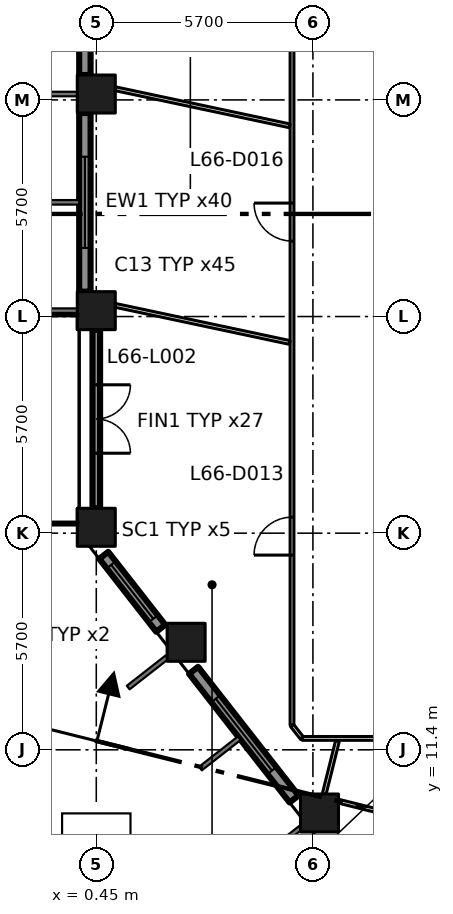
"""IFC4 building model, lengths in metres.
Left out: names, types, materials, properties, quantities, classifications, styles, units other than length and angle.
Written with IfcOpenShell. Run it as: python <this file> out.ifc"""

import sys

from ifc_helpers import new_model, si_unit, direction, frame, frame_2d, origin, origin_2d, place, context, subcontext, project, spatial, rectangle, extrude, element, fill, save


model = new_model("IFC4")
c1 = context("Model", 3, precision=1e-05, world=origin(), true_north=direction((0.0, 1.0)))
c2 = subcontext(c1, "Body", "Model", "MODEL_VIEW")
j1 = project(units=[si_unit("LENGTHUNIT", "METRE"), si_unit("PLANEANGLEUNIT", "RADIAN")], contexts=[c1])
p1 = place(None, origin())
s1 = spatial("IfcSite", under=j1, at=p1, CompositionType="ELEMENT")
p2 = place(p1, origin())
s2 = spatial("IfcBuilding", under=s1, at=p2, CompositionType="ELEMENT")
p3 = place(p2, frame((0.0, 0.0, 289.8)))
s3 = spatial("IfcBuildingStorey", under=s2, at=p3, CompositionType="ELEMENT", Elevation=289.8)
for number, where, z_axis, x_axis in (
    (1, (0.45, 17.255, 0.0), (0.0, 0.0, 1.0), (1.0, 0.0, 0.0)),
    (2, (0.45, 22.955, 0.0), (0.0, 0.0, 1.0), (1.0, 0.0, 0.0)),
    (3, (0.45, 28.655, 0.0), (0.0, 0.0, 1.0), (1.0, 0.0, 0.0)),
    (4, (6.323, 9.737, 0.0), (0.0, 0.0, 1.0), (1.0, 0.0, 0.0)),
    (5, (2.814, 14.229, 0.0), (0.0, 0.0, 1.0), (1.0, 0.0, 0.0)),
):
    element("IfcColumn", number, at=place(p3, frame(where, z_axis=z_axis, x_axis=x_axis)), inside=s3, PredefinedType="COLUMN", context=c2, shape_type="SweptSolid", body=[
        extrude(rectangle(XDim=1.0, YDim=1.0, at=origin_2d()), origin(), (0.0, 0.0, 1.0), 4.2),
    ])
p4 = place(p3, frame((0.15, 33.855, 0.0), z_axis=(0.0, 0.0, 1.0), x_axis=(0.0, -1.0, 0.0)))
e6 = element("IfcWall", 6, at=p4, inside=s3, PredefinedType="SOLIDWALL", context=c2, shape_type="SweptSolid", body=[
    extrude(rectangle(XDim=4.7, YDim=0.3, at=frame_2d((2.35, 0.0))), origin(), (0.0, 0.0, 1.0), 3.2),
])
p5 = place(p4, frame((1.15, 0.0, 0.8)))
e7 = element("IfcOpeningElement", 7, at=p5, cuts=e6, PredefinedType="OPENING", context=c2, shape_type="SweptSolid", body=[
    extrude(rectangle(XDim=2.4, YDim=2.1, at=frame_2d((1.2, 1.05))), frame((0.0, 0.16, 0.0), z_axis=(0.0, -1.0, 0.0), x_axis=(1.0, 0.0, 0.0)), (0.0, 0.0, 1.0), 0.32),
])
p6 = place(p3, frame((0.15, 28.155, 0.0), z_axis=(0.0, 0.0, 1.0), x_axis=(0.0, -1.0, 0.0)))
e8 = element("IfcWall", 8, at=p6, inside=s3, PredefinedType="SOLIDWALL", context=c2, shape_type="SweptSolid", body=[
    extrude(rectangle(XDim=4.7, YDim=0.3, at=frame_2d((2.35, 0.0))), origin(), (0.0, 0.0, 1.0), 3.2),
])
p7 = place(p6, frame((1.15, 0.0, 0.8)))
e9 = element("IfcOpeningElement", 9, at=p7, cuts=e8, PredefinedType="OPENING", context=c2, shape_type="SweptSolid", body=[
    extrude(rectangle(XDim=2.4, YDim=2.1, at=frame_2d((1.2, 1.05))), frame((0.0, 0.16, 0.0), z_axis=(0.0, -1.0, 0.0), x_axis=(1.0, 0.0, 0.0)), (0.0, 0.0, 1.0), 0.32),
])
p8 = place(p3, frame((0.45, 22.454, 0.0), z_axis=(0.0, 0.0, 1.0), x_axis=(0.0, -1.0, 0.0)))
e10 = element("IfcWall", 10, at=p8, inside=s3, PredefinedType="SOLIDWALL", context=c2, shape_type="SweptSolid", body=[
    extrude(rectangle(XDim=4.699, YDim=0.2, at=frame_2d((2.35, 0.0))), origin(), (0.0, 0.0, 1.0), 3.2),
])
p9 = place(p8, frame((1.45, 0.0, 0.0)))
e11 = element("IfcOpeningElement", 11, at=p9, cuts=e10, PredefinedType="OPENING", context=c2, shape_type="SweptSolid", body=[
    extrude(rectangle(XDim=1.8, YDim=2.9, at=frame_2d((0.9, 1.45))), frame((0.0, 0.11, 0.0), z_axis=(0.0, -1.0, 0.0), x_axis=(1.0, 0.0, 0.0)), (0.0, 0.0, 1.0), 0.22),
])
p10 = place(p3, frame((-0.88, 22.785, 0.0), z_axis=(0.0, 0.0, 1.0), x_axis=(0.0, -1.0, 0.0)))
e12 = element("IfcWall", 12, at=p10, inside=s3, PredefinedType="SOLIDWALL", context=c2, shape_type="SweptSolid", body=[
    extrude(rectangle(XDim=5.36, YDim=0.4, at=frame_2d((2.68, 0.0))), origin(), (0.0, 0.0, 1.0), 0.3),
])
p11 = place(p3, frame((0.646, 16.517, 0.0), z_axis=(0.0, 0.0, 1.0), x_axis=(0.615610986717, -0.788050197026, 0.0)))
e13 = element("IfcWall", 13, at=p11, inside=s3, PredefinedType="SOLIDWALL", context=c2, shape_type="SweptSolid", body=[
    extrude(rectangle(XDim=2.437, YDim=0.3, at=frame_2d((1.218, 0.0))), origin(), (0.0, 0.0, 1.0), 3.2),
])
p12 = place(p11, frame((0.318, 0.0, 0.8)))
e14 = element("IfcOpeningElement", 14, at=p12, cuts=e13, PredefinedType="OPENING", context=c2, shape_type="SweptSolid", body=[
    extrude(rectangle(XDim=1.8, YDim=2.1, at=frame_2d((0.9, 1.05))), frame((0.0, 0.16, 0.0), z_axis=(0.0, -1.0, 0.0), x_axis=(1.0, 0.0, 0.0)), (0.0, 0.0, 1.0), 0.32),
])
p13 = place(p3, frame((3.01, 13.491, 0.0), z_axis=(0.0, 0.0, 1.0), x_axis=(0.615713519567, -0.787970089421, 0.0)))
e15 = element("IfcWall", 15, at=p13, inside=s3, PredefinedType="SOLIDWALL", context=c2, shape_type="SweptSolid", body=[
    extrude(rectangle(XDim=4.296, YDim=0.3, at=frame_2d((2.148, 0.0))), origin(), (0.0, 0.0, 1.0), 3.2),
])
p14 = place(p13, frame((0.948, 0.0, 0.8)))
e16 = element("IfcOpeningElement", 16, at=p14, cuts=e15, PredefinedType="OPENING", context=c2, shape_type="SweptSolid", body=[
    extrude(rectangle(XDim=2.4, YDim=2.1, at=frame_2d((1.2, 1.05))), frame((0.0, 0.16, 0.0), z_axis=(0.0, -1.0, 0.0), x_axis=(1.0, 0.0, 0.0)), (0.0, 0.0, 1.0), 0.32),
])
p15 = place(p3, frame((5.6, 12.043, 0.0), z_axis=(0.0, 0.0, 1.0), x_axis=(0.0, 1.0, 0.0)))
e17 = element("IfcWall", 17, at=p15, inside=s3, PredefinedType="PARTITIONING", context=c2, shape_type="SweptSolid", body=[
    extrude(rectangle(XDim=27.162, YDim=0.1, at=frame_2d((13.581, 0.0))), origin(), (0.0, 0.0, 1.0), 3.9),
])
p16 = place(p15, frame((4.48, 0.0, 0.0)))
e18 = element("IfcOpeningElement", 18, at=p16, cuts=e17, PredefinedType="OPENING", context=c2, shape_type="SweptSolid", body=[
    extrude(rectangle(XDim=1.0, YDim=2.1, at=frame_2d((0.5, 1.05))), frame((0.0, 0.06, 0.0), z_axis=(0.0, -1.0, 0.0), x_axis=(1.0, 0.0, 0.0)), (0.0, 0.0, 1.0), 0.12),
])
p17 = place(p15, frame((12.742, 0.0, 0.0)))
e19 = element("IfcOpeningElement", 19, at=p17, cuts=e17, PredefinedType="OPENING", context=c2, shape_type="SweptSolid", body=[
    extrude(rectangle(XDim=1.0, YDim=2.1, at=frame_2d((0.5, 1.05))), frame((0.0, 0.06, 0.0), z_axis=(0.0, -1.0, 0.0), x_axis=(1.0, 0.0, 0.0)), (0.0, 0.0, 1.0), 0.12),
])
p18 = place(p15, frame((21.142, 0.0, 0.0)))
e20 = element("IfcOpeningElement", 20, at=p18, cuts=e17, PredefinedType="OPENING", context=c2, shape_type="SweptSolid", body=[
    extrude(rectangle(XDim=1.0, YDim=2.1, at=frame_2d((0.5, 1.05))), frame((0.0, 0.06, 0.0), z_axis=(0.0, -1.0, 0.0), x_axis=(1.0, 0.0, 0.0)), (0.0, 0.0, 1.0), 0.12),
])
p19 = place(p3, frame((5.6, 12.043, 0.0), z_axis=(0.0, 0.0, 1.0), x_axis=(0.615415398102, -0.788202948344, 0.0)))
e21 = element("IfcWall", 21, at=p19, inside=s3, PredefinedType="PARTITIONING", context=c2, shape_type="SweptSolid", body=[
    extrude(rectangle(XDim=0.435, YDim=0.1, at=frame_2d((0.218, 0.0))), origin(), (0.0, 0.0, 1.0), 3.9),
])
p20 = place(p3, frame((5.868, 11.7, 0.0), z_axis=(0.0, 0.0, 1.0), x_axis=(1.0, 0.0, 0.0)))
e22 = element("IfcWall", 22, at=p20, inside=s3, PredefinedType="PARTITIONING", context=c2, shape_type="SweptSolid", body=[
    extrude(rectangle(XDim=4.032, YDim=0.1, at=frame_2d((2.016, 0.0))), origin(), (0.0, 0.0, 1.0), 3.9),
])
for number, where, z_axis, x_axis in (
    (23, (5.54, 22.118, 0.0), (0.0, 0.0, 1.0), (-0.978, 0.208, 0.0)),
    (24, (5.54, 27.818, 0.0), (0.0, 0.0, 1.0), (-0.978, 0.208, 0.0)),
):
    element("IfcWall", number, at=place(p3, frame(where, z_axis=z_axis, x_axis=x_axis)), inside=s3, PredefinedType="PARTITIONING", context=c2, shape_type="SweptSolid", body=[
        extrude(rectangle(XDim=4.693, YDim=0.1, at=frame_2d((2.346, 0.0))), origin(), (0.0, 0.0, 1.0), 3.9),
    ])
p21 = place(p3, frame((6.797, 11.638, 0.0), z_axis=(0.0, 0.0, 1.0), x_axis=(-0.242456058691, -0.970162388265, 0.0)))
e25 = element("IfcWall", 25, at=p21, inside=s3, PredefinedType="PARTITIONING", context=c2, shape_type="SweptSolid", body=[
    extrude(rectangle(XDim=1.444, YDim=0.1, at=frame_2d((0.722, 0.0))), origin(), (0.0, 0.0, 1.0), 3.9),
])
p22 = place(p3, frame((8.72, 9.575, 0.0), z_axis=(0.0, 0.0, 1.0), x_axis=(-0.970274576003, 0.242006708918, 0.0)))
e26 = element("IfcWall", 26, at=p22, inside=s3, PredefinedType="PARTITIONING", context=c2, shape_type="SweptSolid", body=[
    extrude(rectangle(XDim=1.955, YDim=0.1, at=frame_2d((0.978, 0.0))), origin(), (0.0, 0.0, 1.0), 3.9),
])
p23 = place(p7, origin())
e27 = element("IfcWindow", 27, at=p23, inside=s3, PartitioningType="DOUBLE_PANEL_VERTICAL", PredefinedType="WINDOW", context=c2, shape_type="SweptSolid", body=[
    extrude(rectangle(XDim=2.4, YDim=2.1, at=frame_2d((1.2, 1.05))), frame((0.0, 0.03, 0.0), z_axis=(0.0, -1.0, 0.0), x_axis=(1.0, 0.0, 0.0)), (0.0, 0.0, 1.0), 0.06),
])
fill(e9, e27)
p24 = place(p9, origin())
e28 = element("IfcDoor", 28, at=p24, inside=s3, OperationType="DOUBLE_DOOR_SINGLE_SWING", PredefinedType="DOOR", context=c2, shape_type="SweptSolid", body=[
    extrude(rectangle(XDim=1.8, YDim=2.9, at=frame_2d((0.9, 1.45))), frame((0.0, 0.025, 0.0), z_axis=(0.0, -1.0, 0.0), x_axis=(1.0, 0.0, 0.0)), (0.0, 0.0, 1.0), 0.05),
])
fill(e11, e28)
p25 = place(p12, origin())
e29 = element("IfcWindow", 29, at=p25, inside=s3, PartitioningType="DOUBLE_PANEL_VERTICAL", PredefinedType="WINDOW", context=c2, shape_type="SweptSolid", body=[
    extrude(rectangle(XDim=1.8, YDim=2.1, at=frame_2d((0.9, 1.05))), frame((0.0, 0.03, 0.0), z_axis=(0.0, -1.0, 0.0), x_axis=(1.0, 0.0, 0.0)), (0.0, 0.0, 1.0), 0.06),
])
fill(e14, e29)
p26 = place(p14, origin())
e30 = element("IfcWindow", 30, at=p26, inside=s3, PartitioningType="DOUBLE_PANEL_VERTICAL", PredefinedType="WINDOW", context=c2, shape_type="SweptSolid", body=[
    extrude(rectangle(XDim=2.4, YDim=2.1, at=frame_2d((1.2, 1.05))), frame((0.0, 0.03, 0.0), z_axis=(0.0, -1.0, 0.0), x_axis=(1.0, 0.0, 0.0)), (0.0, 0.0, 1.0), 0.06),
])
fill(e16, e30)
p27 = place(p16, origin())
e31 = element("IfcDoor", 31, at=p27, inside=s3, OperationType="SINGLE_SWING_LEFT", PredefinedType="DOOR", context=c2, shape_type="SweptSolid", body=[
    extrude(rectangle(XDim=1.0, YDim=2.1, at=frame_2d((0.5, 1.05))), frame((0.0, 0.025, 0.0), z_axis=(0.0, -1.0, 0.0), x_axis=(1.0, 0.0, 0.0)), (0.0, 0.0, 1.0), 0.05),
])
fill(e18, e31)
p28 = place(p17, origin())
e32 = element("IfcDoor", 32, at=p28, inside=s3, OperationType="SINGLE_SWING_RIGHT", PredefinedType="DOOR", context=c2, shape_type="SweptSolid", body=[
    extrude(rectangle(XDim=1.0, YDim=2.1, at=frame_2d((0.5, 1.05))), frame((0.0, 0.025, 0.0), z_axis=(0.0, -1.0, 0.0), x_axis=(1.0, 0.0, 0.0)), (0.0, 0.0, 1.0), 0.05),
])
fill(e19, e32)
save(model, sys.argv[1])
